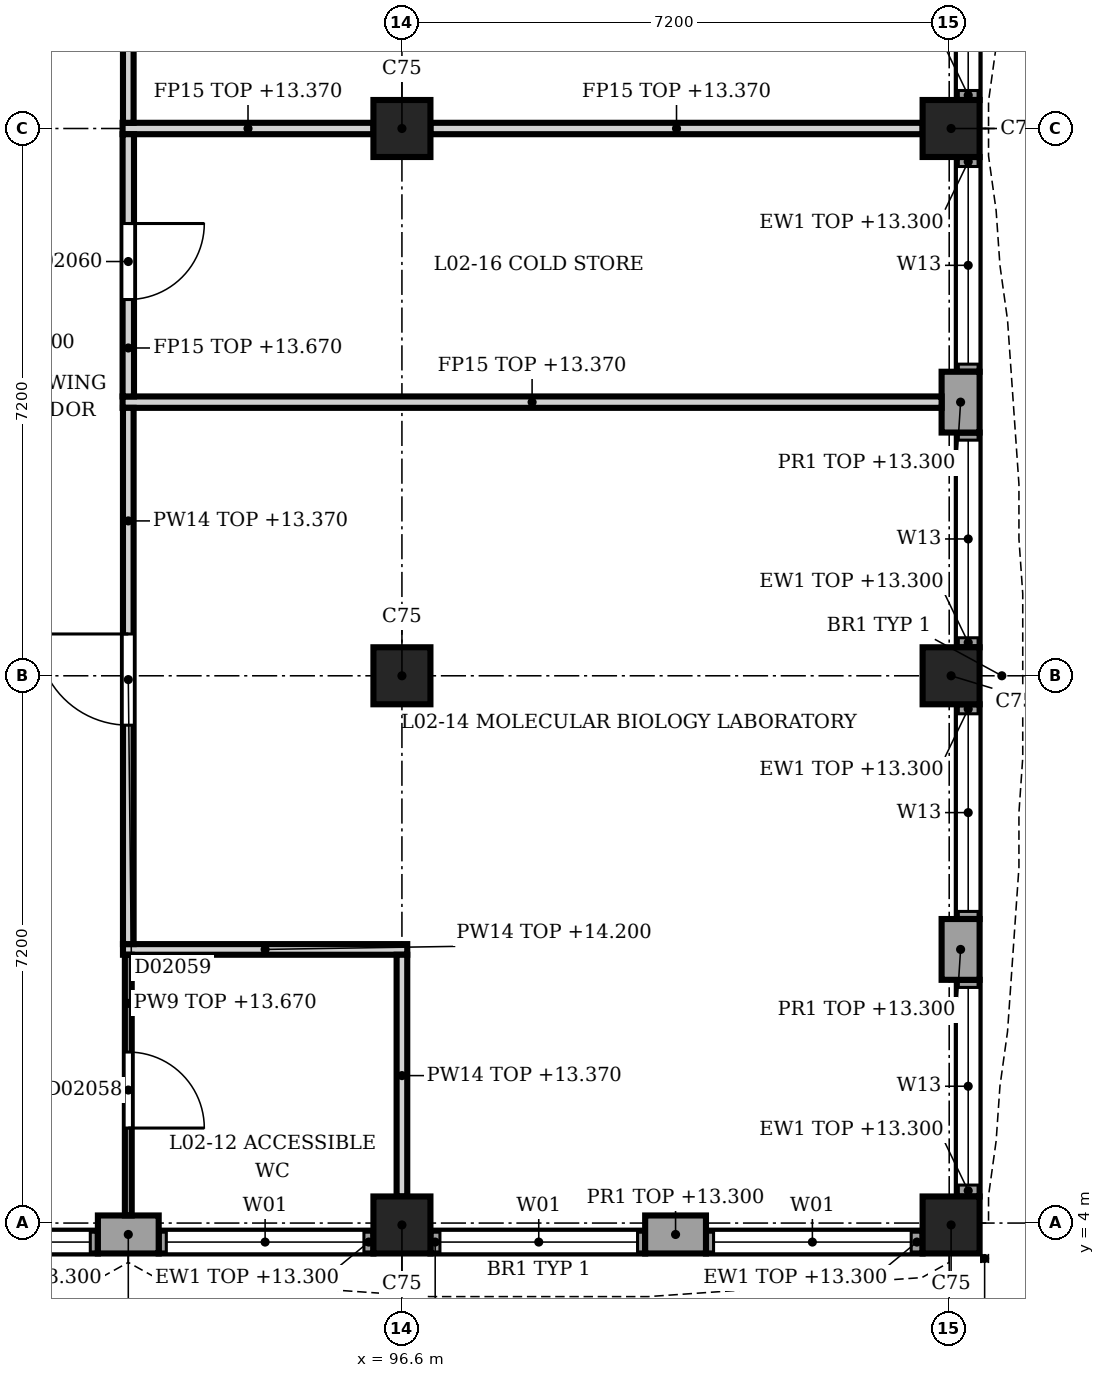
"""IFC4 building model, lengths in metres.
Left out: names, types, materials, properties, quantities, classifications, styles, units other than length and angle.
Written with IfcOpenShell. Run it as: python <this file> out.ifc"""

import sys

from ifc_helpers import new_model, si_unit, direction, frame, frame_2d, origin, origin_2d, place, context, subcontext, project, spatial, rectangle, extrude, element, fill, save


model = new_model("IFC4")
c1 = context("Model", 3, precision=1e-05, world=origin(), true_north=direction((0.0, 1.0)))
c2 = subcontext(c1, "Body", "Model", "MODEL_VIEW")
j1 = project(units=[si_unit("LENGTHUNIT", "METRE"), si_unit("PLANEANGLEUNIT", "RADIAN")], contexts=[c1])
p1 = place(None, origin())
s1 = spatial("IfcSite", under=j1, at=p1, CompositionType="ELEMENT")
p2 = place(p1, origin())
s2 = spatial("IfcBuilding", under=s1, at=p2, CompositionType="ELEMENT")
p3 = place(p2, frame((0.0, 0.0, 9.9)))
s3 = spatial("IfcBuildingStorey", under=s2, at=p3, CompositionType="ELEMENT", Elevation=9.9)
for number, where, z_axis, x_axis in (
    (1, (96.6, 3.975, 0.0), (0.0, 0.0, 1.0), (1.0, 0.0, 0.0)),
    (2, (96.6, 11.2, 0.0), (0.0, 0.0, 1.0), (1.0, 0.0, 0.0)),
    (3, (96.6, 18.4, 0.0), (0.0, 0.0, 1.0), (1.0, 0.0, 0.0)),
    (4, (103.825, 3.975, 0.0), (0.0, 0.0, 1.0), (1.0, 0.0, 0.0)),
    (5, (103.825, 11.2, 0.0), (0.0, 0.0, 1.0), (1.0, 0.0, 0.0)),
    (6, (103.825, 18.4, 0.0), (0.0, 0.0, 1.0), (1.0, 0.0, 0.0)),
):
    element("IfcColumn", number, at=place(p3, frame(where, z_axis=z_axis, x_axis=x_axis)), inside=s3, PredefinedType="COLUMN", context=c2, shape_type="SweptSolid", body=[
        extrude(rectangle(XDim=0.75, YDim=0.75, at=origin_2d()), origin(), (0.0, 0.0, 1.0), 4.5),
    ])
for number, where, z_axis, x_axis in (
    (7, (103.95, 15.2, 0.0), (0.0, 0.0, 1.0), (0.0, -1.0, 0.0)),
    (8, (103.95, 8.0, 0.0), (0.0, 0.0, 1.0), (0.0, -1.0, 0.0)),
):
    element("IfcWall", number, at=place(p3, frame(where, z_axis=z_axis, x_axis=x_axis)), inside=s3, PredefinedType="SOLIDWALL", context=c2, shape_type="SweptSolid", body=[
        extrude(rectangle(XDim=0.8, YDim=0.5, at=frame_2d((0.4, 0.0))), origin(), (0.0, 0.0, 1.0), 3.4),
    ])
p4 = place(p3, frame((104.05, 21.6, 0.0), z_axis=(0.0, 0.0, 1.0), x_axis=(0.0, -1.0, 0.0)))
e9 = element("IfcWall", 9, at=p4, inside=s3, PredefinedType="SOLIDWALL", context=c2, shape_type="SweptSolid", body=[
    extrude(rectangle(XDim=2.825, YDim=0.3, at=frame_2d((1.413, 0.0))), origin(), (0.0, 0.0, 1.0), 3.4),
])
p5 = place(p4, frame((0.1, 0.0, 0.9)))
e10 = element("IfcOpeningElement", 10, at=p5, cuts=e9, PredefinedType="OPENING", context=c2, shape_type="SweptSolid", body=[
    extrude(rectangle(XDim=2.6, YDim=2.2, at=frame_2d((1.3, 1.1))), frame((0.0, 0.16, 0.0), z_axis=(0.0, -1.0, 0.0), x_axis=(1.0, 0.0, 0.0)), (0.0, 0.0, 1.0), 0.32),
])
p6 = place(p3, frame((104.05, 18.025, 0.0), z_axis=(0.0, 0.0, 1.0), x_axis=(0.0, -1.0, 0.0)))
e11 = element("IfcWall", 11, at=p6, inside=s3, PredefinedType="SOLIDWALL", context=c2, shape_type="SweptSolid", body=[
    extrude(rectangle(XDim=2.825, YDim=0.3, at=frame_2d((1.413, 0.0))), origin(), (0.0, 0.0, 1.0), 3.4),
])
p7 = place(p6, frame((0.125, 0.0, 0.9)))
e12 = element("IfcOpeningElement", 12, at=p7, cuts=e11, PredefinedType="OPENING", context=c2, shape_type="SweptSolid", body=[
    extrude(rectangle(XDim=2.6, YDim=2.2, at=frame_2d((1.3, 1.1))), frame((0.0, 0.16, 0.0), z_axis=(0.0, -1.0, 0.0), x_axis=(1.0, 0.0, 0.0)), (0.0, 0.0, 1.0), 0.32),
])
p8 = place(p3, frame((104.05, 14.4, 0.0), z_axis=(0.0, 0.0, 1.0), x_axis=(0.0, -1.0, 0.0)))
e13 = element("IfcWall", 13, at=p8, inside=s3, PredefinedType="SOLIDWALL", context=c2, shape_type="SweptSolid", body=[
    extrude(rectangle(XDim=2.825, YDim=0.3, at=frame_2d((1.413, 0.0))), origin(), (0.0, 0.0, 1.0), 3.4),
])
p9 = place(p8, frame((0.1, 0.0, 0.9)))
e14 = element("IfcOpeningElement", 14, at=p9, cuts=e13, PredefinedType="OPENING", context=c2, shape_type="SweptSolid", body=[
    extrude(rectangle(XDim=2.6, YDim=2.2, at=frame_2d((1.3, 1.1))), frame((0.0, 0.16, 0.0), z_axis=(0.0, -1.0, 0.0), x_axis=(1.0, 0.0, 0.0)), (0.0, 0.0, 1.0), 0.32),
])
p10 = place(p3, frame((104.05, 10.825, 0.0), z_axis=(0.0, 0.0, 1.0), x_axis=(0.0, -1.0, 0.0)))
e15 = element("IfcWall", 15, at=p10, inside=s3, PredefinedType="SOLIDWALL", context=c2, shape_type="SweptSolid", body=[
    extrude(rectangle(XDim=2.825, YDim=0.3, at=frame_2d((1.413, 0.0))), origin(), (0.0, 0.0, 1.0), 3.4),
])
p11 = place(p10, frame((0.125, 0.0, 0.9)))
e16 = element("IfcOpeningElement", 16, at=p11, cuts=e15, PredefinedType="OPENING", context=c2, shape_type="SweptSolid", body=[
    extrude(rectangle(XDim=2.6, YDim=2.2, at=frame_2d((1.3, 1.1))), frame((0.0, 0.16, 0.0), z_axis=(0.0, -1.0, 0.0), x_axis=(1.0, 0.0, 0.0)), (0.0, 0.0, 1.0), 0.32),
])
p12 = place(p3, frame((104.05, 7.2, 0.0), z_axis=(0.0, 0.0, 1.0), x_axis=(0.0, -1.0, 0.0)))
e17 = element("IfcWall", 17, at=p12, inside=s3, PredefinedType="SOLIDWALL", context=c2, shape_type="SweptSolid", body=[
    extrude(rectangle(XDim=2.85, YDim=0.3, at=frame_2d((1.425, 0.0))), origin(), (0.0, 0.0, 1.0), 3.4),
])
p13 = place(p12, frame((0.1, 0.0, 0.9)))
e18 = element("IfcOpeningElement", 18, at=p13, cuts=e17, PredefinedType="OPENING", context=c2, shape_type="SweptSolid", body=[
    extrude(rectangle(XDim=2.6, YDim=2.2, at=frame_2d((1.3, 1.1))), frame((0.0, 0.16, 0.0), z_axis=(0.0, -1.0, 0.0), x_axis=(1.0, 0.0, 0.0)), (0.0, 0.0, 1.0), 0.32),
])
p14 = place(p3, frame((100.6, 3.85, 0.0), z_axis=(0.0, 0.0, 1.0), x_axis=(-1.0, 0.0, 0.0)))
e19 = element("IfcWall", 19, at=p14, inside=s3, PredefinedType="SOLIDWALL", context=c2, shape_type="SweptSolid", body=[
    extrude(rectangle(XDim=0.8, YDim=0.5, at=frame_2d((0.4, 0.0))), origin(), (0.0, 0.0, 1.0), 3.4),
])
p15 = place(p3, frame((93.4, 3.85, 0.0), z_axis=(0.0, 0.0, 1.0), x_axis=(-1.0, 0.0, 0.0)))
e20 = element("IfcWall", 20, at=p15, inside=s3, PredefinedType="SOLIDWALL", context=c2, shape_type="SweptSolid", body=[
    extrude(rectangle(XDim=0.8, YDim=0.5, at=frame_2d((0.4, 0.0))), origin(), (0.0, 0.0, 1.0), 3.4),
])
p16 = place(p3, frame((103.45, 3.75, 0.0), z_axis=(0.0, 0.0, 1.0), x_axis=(-1.0, 0.0, 0.0)))
e21 = element("IfcWall", 21, at=p16, inside=s3, PredefinedType="SOLIDWALL", context=c2, shape_type="SweptSolid", body=[
    extrude(rectangle(XDim=2.85, YDim=0.3, at=frame_2d((1.425, 0.0))), origin(), (0.0, 0.0, 1.0), 3.4),
])
p17 = place(p16, frame((0.15, 0.0, 0.9)))
e22 = element("IfcOpeningElement", 22, at=p17, cuts=e21, PredefinedType="OPENING", context=c2, shape_type="SweptSolid", body=[
    extrude(rectangle(XDim=2.6, YDim=2.4, at=frame_2d((1.3, 1.2))), frame((0.0, 0.16, 0.0), z_axis=(0.0, -1.0, 0.0), x_axis=(1.0, 0.0, 0.0)), (0.0, 0.0, 1.0), 0.32),
])
p18 = place(p3, frame((99.8, 3.75, 0.0), z_axis=(0.0, 0.0, 1.0), x_axis=(-1.0, 0.0, 0.0)))
e23 = element("IfcWall", 23, at=p18, inside=s3, PredefinedType="SOLIDWALL", context=c2, shape_type="SweptSolid", body=[
    extrude(rectangle(XDim=2.825, YDim=0.3, at=frame_2d((1.413, 0.0))), origin(), (0.0, 0.0, 1.0), 3.4),
])
p19 = place(p18, frame((0.1, 0.0, 0.9)))
e24 = element("IfcOpeningElement", 24, at=p19, cuts=e23, PredefinedType="OPENING", context=c2, shape_type="SweptSolid", body=[
    extrude(rectangle(XDim=2.6, YDim=2.4, at=frame_2d((1.3, 1.2))), frame((0.0, 0.16, 0.0), z_axis=(0.0, -1.0, 0.0), x_axis=(1.0, 0.0, 0.0)), (0.0, 0.0, 1.0), 0.32),
])
p20 = place(p3, frame((96.225, 3.75, 0.0), z_axis=(0.0, 0.0, 1.0), x_axis=(-1.0, 0.0, 0.0)))
e25 = element("IfcWall", 25, at=p20, inside=s3, PredefinedType="SOLIDWALL", context=c2, shape_type="SweptSolid", body=[
    extrude(rectangle(XDim=2.825, YDim=0.3, at=frame_2d((1.413, 0.0))), origin(), (0.0, 0.0, 1.0), 3.4),
])
p21 = place(p20, frame((0.125, 0.0, 0.9)))
e26 = element("IfcOpeningElement", 26, at=p21, cuts=e25, PredefinedType="OPENING", context=c2, shape_type="SweptSolid", body=[
    extrude(rectangle(XDim=2.6, YDim=2.4, at=frame_2d((1.3, 1.2))), frame((0.0, 0.16, 0.0), z_axis=(0.0, -1.0, 0.0), x_axis=(1.0, 0.0, 0.0)), (0.0, 0.0, 1.0), 0.32),
])
p22 = place(p3, frame((92.6, 3.75, 0.0), z_axis=(0.0, 0.0, 1.0), x_axis=(-1.0, 0.0, 0.0)))
e27 = element("IfcWall", 27, at=p22, inside=s3, PredefinedType="SOLIDWALL", context=c2, shape_type="SweptSolid", body=[
    extrude(rectangle(XDim=2.825, YDim=0.3, at=frame_2d((1.413, 0.0))), origin(), (0.0, 0.0, 1.0), 3.4),
])
p23 = place(p22, frame((0.1, 0.0, 0.9)))
e28 = element("IfcOpeningElement", 28, at=p23, cuts=e27, PredefinedType="OPENING", context=c2, shape_type="SweptSolid", body=[
    extrude(rectangle(XDim=2.6, YDim=2.4, at=frame_2d((1.3, 1.2))), frame((0.0, 0.16, 0.0), z_axis=(0.0, -1.0, 0.0), x_axis=(1.0, 0.0, 0.0)), (0.0, 0.0, 1.0), 0.32),
])
p24 = place(p3, frame((92.93, 7.6, 0.0), z_axis=(0.0, 0.0, 1.0), x_axis=(1.0, 0.0, 0.0)))
e29 = element("IfcWall", 29, at=p24, inside=s3, PredefinedType="PARTITIONING", context=c2, shape_type="SweptSolid", body=[
    extrude(rectangle(XDim=3.74, YDim=0.14, at=frame_2d((1.87, 0.0))), origin(), (0.0, 0.0, 1.0), 4.3),
])
p25 = place(p3, frame((92.925, 14.8, 0.0), z_axis=(0.0, 0.0, 1.0), x_axis=(1.0, 0.0, 0.0)))
e30 = element("IfcWall", 30, at=p25, inside=s3, PredefinedType="PARTITIONING", context=c2, shape_type="SweptSolid", body=[
    extrude(rectangle(XDim=10.775, YDim=0.15, at=frame_2d((5.387, 0.0))), origin(), (0.0, 0.0, 1.0), 3.47),
])
p26 = place(p3, frame((92.925, 18.4, 0.0), z_axis=(0.0, 0.0, 1.0), x_axis=(1.0, 0.0, 0.0)))
e31 = element("IfcWall", 31, at=p26, inside=s3, PredefinedType="PARTITIONING", context=c2, shape_type="SweptSolid", body=[
    extrude(rectangle(XDim=3.3, YDim=0.15, at=frame_2d((1.65, 0.0))), origin(), (0.0, 0.0, 1.0), 3.47),
])
p27 = place(p3, frame((96.975, 18.4, 0.0), z_axis=(0.0, 0.0, 1.0), x_axis=(1.0, 0.0, 0.0)))
e32 = element("IfcWall", 32, at=p27, inside=s3, PredefinedType="PARTITIONING", context=c2, shape_type="SweptSolid", body=[
    extrude(rectangle(XDim=6.475, YDim=0.15, at=frame_2d((3.237, 0.0))), origin(), (0.0, 0.0, 1.0), 3.47),
])
p28 = place(p3, frame((93.0, 7.53, 0.0), z_axis=(0.0, 0.0, 1.0), x_axis=(0.0, -1.0, 0.0)))
e33 = element("IfcWall", 33, at=p28, inside=s3, PredefinedType="PARTITIONING", context=c2, shape_type="SweptSolid", body=[
    extrude(rectangle(XDim=3.43, YDim=0.09, at=frame_2d((1.715, 0.0))), origin(), (0.0, 0.0, 1.0), 3.77),
])
p29 = place(p28, frame((1.28, 0.0, 0.0)))
e34 = element("IfcOpeningElement", 34, at=p29, cuts=e33, PredefinedType="OPENING", context=c2, shape_type="SweptSolid", body=[
    extrude(rectangle(XDim=1.0, YDim=2.2, at=frame_2d((0.5, 1.1))), frame((0.0, 0.055, 0.0), z_axis=(0.0, -1.0, 0.0), x_axis=(1.0, 0.0, 0.0)), (0.0, 0.0, 1.0), 0.11),
])
p30 = place(p3, frame((93.0, 14.725, 0.0), z_axis=(0.0, 0.0, 1.0), x_axis=(0.0, -1.0, 0.0)))
e35 = element("IfcWall", 35, at=p30, inside=s3, PredefinedType="PARTITIONING", context=c2, shape_type="SweptSolid", body=[
    extrude(rectangle(XDim=7.055, YDim=0.14, at=frame_2d((3.528, 0.0))), origin(), (0.0, 0.0, 1.0), 3.47),
])
p31 = place(p30, frame((2.975, 0.0, 0.0)))
e36 = element("IfcOpeningElement", 36, at=p31, cuts=e35, PredefinedType="OPENING", context=c2, shape_type="SweptSolid", body=[
    extrude(rectangle(XDim=1.2, YDim=2.1, at=frame_2d((0.6, 1.05))), frame((0.0, 0.08, 0.0), z_axis=(0.0, -1.0, 0.0), x_axis=(1.0, 0.0, 0.0)), (0.0, 0.0, 1.0), 0.16),
])
p32 = place(p3, frame((93.0, 18.325, 0.0), z_axis=(0.0, 0.0, 1.0), x_axis=(0.0, -1.0, 0.0)))
e37 = element("IfcWall", 37, at=p32, inside=s3, PredefinedType="PARTITIONING", context=c2, shape_type="SweptSolid", body=[
    extrude(rectangle(XDim=3.45, YDim=0.15, at=frame_2d((1.725, 0.0))), origin(), (0.0, 0.0, 1.0), 3.77),
])
p33 = place(p32, frame((1.175, 0.0, 0.0)))
e38 = element("IfcOpeningElement", 38, at=p33, cuts=e37, PredefinedType="OPENING", context=c2, shape_type="SweptSolid", body=[
    extrude(rectangle(XDim=1.0, YDim=2.3, at=frame_2d((0.5, 1.15))), frame((0.0, 0.085, 0.0), z_axis=(0.0, -1.0, 0.0), x_axis=(1.0, 0.0, 0.0)), (0.0, 0.0, 1.0), 0.17),
])
p34 = place(p3, frame((93.0, 18.475, 0.0), z_axis=(0.0, 0.0, 1.0), x_axis=(0.0, 1.0, 0.0)))
e39 = element("IfcWall", 39, at=p34, inside=s3, PredefinedType="PARTITIONING", context=c2, shape_type="SweptSolid", body=[
    extrude(rectangle(XDim=3.455, YDim=0.14, at=frame_2d((1.728, 0.0))), origin(), (0.0, 0.0, 1.0), 4.3),
])
p35 = place(p3, frame((96.6, 4.35, 0.0), z_axis=(0.0, 0.0, 1.0), x_axis=(0.0, 1.0, 0.0)))
e40 = element("IfcWall", 40, at=p35, inside=s3, PredefinedType="PARTITIONING", context=c2, shape_type="SweptSolid", body=[
    extrude(rectangle(XDim=3.18, YDim=0.14, at=frame_2d((1.59, 0.0))), origin(), (0.0, 0.0, 1.0), 3.47),
])
p36 = place(p5, origin())
e41 = element("IfcWindow", 41, at=p36, inside=s3, PartitioningType="SINGLE_PANEL", PredefinedType="WINDOW", context=c2, shape_type="SweptSolid", body=[
    extrude(rectangle(XDim=2.6, YDim=2.2, at=frame_2d((1.3, 1.1))), frame((0.0, 0.03, 0.0), z_axis=(0.0, -1.0, 0.0), x_axis=(1.0, 0.0, 0.0)), (0.0, 0.0, 1.0), 0.06),
])
fill(e10, e41)
p37 = place(p7, origin())
e42 = element("IfcWindow", 42, at=p37, inside=s3, PartitioningType="SINGLE_PANEL", PredefinedType="WINDOW", context=c2, shape_type="SweptSolid", body=[
    extrude(rectangle(XDim=2.6, YDim=2.2, at=frame_2d((1.3, 1.1))), frame((0.0, 0.03, 0.0), z_axis=(0.0, -1.0, 0.0), x_axis=(1.0, 0.0, 0.0)), (0.0, 0.0, 1.0), 0.06),
])
fill(e12, e42)
p38 = place(p9, origin())
e43 = element("IfcWindow", 43, at=p38, inside=s3, PartitioningType="SINGLE_PANEL", PredefinedType="WINDOW", context=c2, shape_type="SweptSolid", body=[
    extrude(rectangle(XDim=2.6, YDim=2.2, at=frame_2d((1.3, 1.1))), frame((0.0, 0.03, 0.0), z_axis=(0.0, -1.0, 0.0), x_axis=(1.0, 0.0, 0.0)), (0.0, 0.0, 1.0), 0.06),
])
fill(e14, e43)
p39 = place(p11, origin())
e44 = element("IfcWindow", 44, at=p39, inside=s3, PartitioningType="SINGLE_PANEL", PredefinedType="WINDOW", context=c2, shape_type="SweptSolid", body=[
    extrude(rectangle(XDim=2.6, YDim=2.2, at=frame_2d((1.3, 1.1))), frame((0.0, 0.03, 0.0), z_axis=(0.0, -1.0, 0.0), x_axis=(1.0, 0.0, 0.0)), (0.0, 0.0, 1.0), 0.06),
])
fill(e16, e44)
p40 = place(p13, origin())
e45 = element("IfcWindow", 45, at=p40, inside=s3, PartitioningType="SINGLE_PANEL", PredefinedType="WINDOW", context=c2, shape_type="SweptSolid", body=[
    extrude(rectangle(XDim=2.6, YDim=2.2, at=frame_2d((1.3, 1.1))), frame((0.0, 0.03, 0.0), z_axis=(0.0, -1.0, 0.0), x_axis=(1.0, 0.0, 0.0)), (0.0, 0.0, 1.0), 0.06),
])
fill(e18, e45)
p41 = place(p17, origin())
e46 = element("IfcWindow", 46, at=p41, inside=s3, PartitioningType="SINGLE_PANEL", PredefinedType="WINDOW", context=c2, shape_type="SweptSolid", body=[
    extrude(rectangle(XDim=2.6, YDim=2.4, at=frame_2d((1.3, 1.2))), frame((0.0, 0.03, 0.0), z_axis=(0.0, -1.0, 0.0), x_axis=(1.0, 0.0, 0.0)), (0.0, 0.0, 1.0), 0.06),
])
fill(e22, e46)
p42 = place(p19, origin())
e47 = element("IfcWindow", 47, at=p42, inside=s3, PartitioningType="SINGLE_PANEL", PredefinedType="WINDOW", context=c2, shape_type="SweptSolid", body=[
    extrude(rectangle(XDim=2.6, YDim=2.4, at=frame_2d((1.3, 1.2))), frame((0.0, 0.03, 0.0), z_axis=(0.0, -1.0, 0.0), x_axis=(1.0, 0.0, 0.0)), (0.0, 0.0, 1.0), 0.06),
])
fill(e24, e47)
p43 = place(p21, origin())
e48 = element("IfcWindow", 48, at=p43, inside=s3, PartitioningType="SINGLE_PANEL", PredefinedType="WINDOW", context=c2, shape_type="SweptSolid", body=[
    extrude(rectangle(XDim=2.6, YDim=2.4, at=frame_2d((1.3, 1.2))), frame((0.0, 0.03, 0.0), z_axis=(0.0, -1.0, 0.0), x_axis=(1.0, 0.0, 0.0)), (0.0, 0.0, 1.0), 0.06),
])
fill(e26, e48)
p44 = place(p23, origin())
e49 = element("IfcWindow", 49, at=p44, inside=s3, PartitioningType="SINGLE_PANEL", PredefinedType="WINDOW", context=c2, shape_type="SweptSolid", body=[
    extrude(rectangle(XDim=2.6, YDim=2.4, at=frame_2d((1.3, 1.2))), frame((0.0, 0.03, 0.0), z_axis=(0.0, -1.0, 0.0), x_axis=(1.0, 0.0, 0.0)), (0.0, 0.0, 1.0), 0.06),
])
fill(e28, e49)
p45 = place(p29, origin())
e50 = element("IfcDoor", 50, at=p45, inside=s3, OperationType="SINGLE_SWING_RIGHT", PredefinedType="DOOR", context=c2, shape_type="SweptSolid", body=[
    extrude(rectangle(XDim=1.0, YDim=2.2, at=frame_2d((0.5, 1.1))), frame((0.0, 0.025, 0.0), z_axis=(0.0, -1.0, 0.0), x_axis=(1.0, 0.0, 0.0)), (0.0, 0.0, 1.0), 0.05),
])
fill(e34, e50)
p46 = place(p31, origin())
e51 = element("IfcDoor", 51, at=p46, inside=s3, OperationType="SINGLE_SWING_RIGHT", PredefinedType="DOOR", context=c2, shape_type="SweptSolid", body=[
    extrude(rectangle(XDim=1.2, YDim=2.1, at=frame_2d((0.6, 1.05))), frame((0.0, 0.025, 0.0), z_axis=(0.0, -1.0, 0.0), x_axis=(1.0, 0.0, 0.0)), (0.0, 0.0, 1.0), 0.05),
])
fill(e36, e51)
p47 = place(p33, origin())
e52 = element("IfcDoor", 52, at=p47, inside=s3, OperationType="SINGLE_SWING_LEFT", PredefinedType="DOOR", context=c2, shape_type="SweptSolid", body=[
    extrude(rectangle(XDim=1.0, YDim=2.3, at=frame_2d((0.5, 1.15))), frame((0.0, 0.025, 0.0), z_axis=(0.0, -1.0, 0.0), x_axis=(1.0, 0.0, 0.0)), (0.0, 0.0, 1.0), 0.05),
])
fill(e38, e52)
save(model, sys.argv[1])
